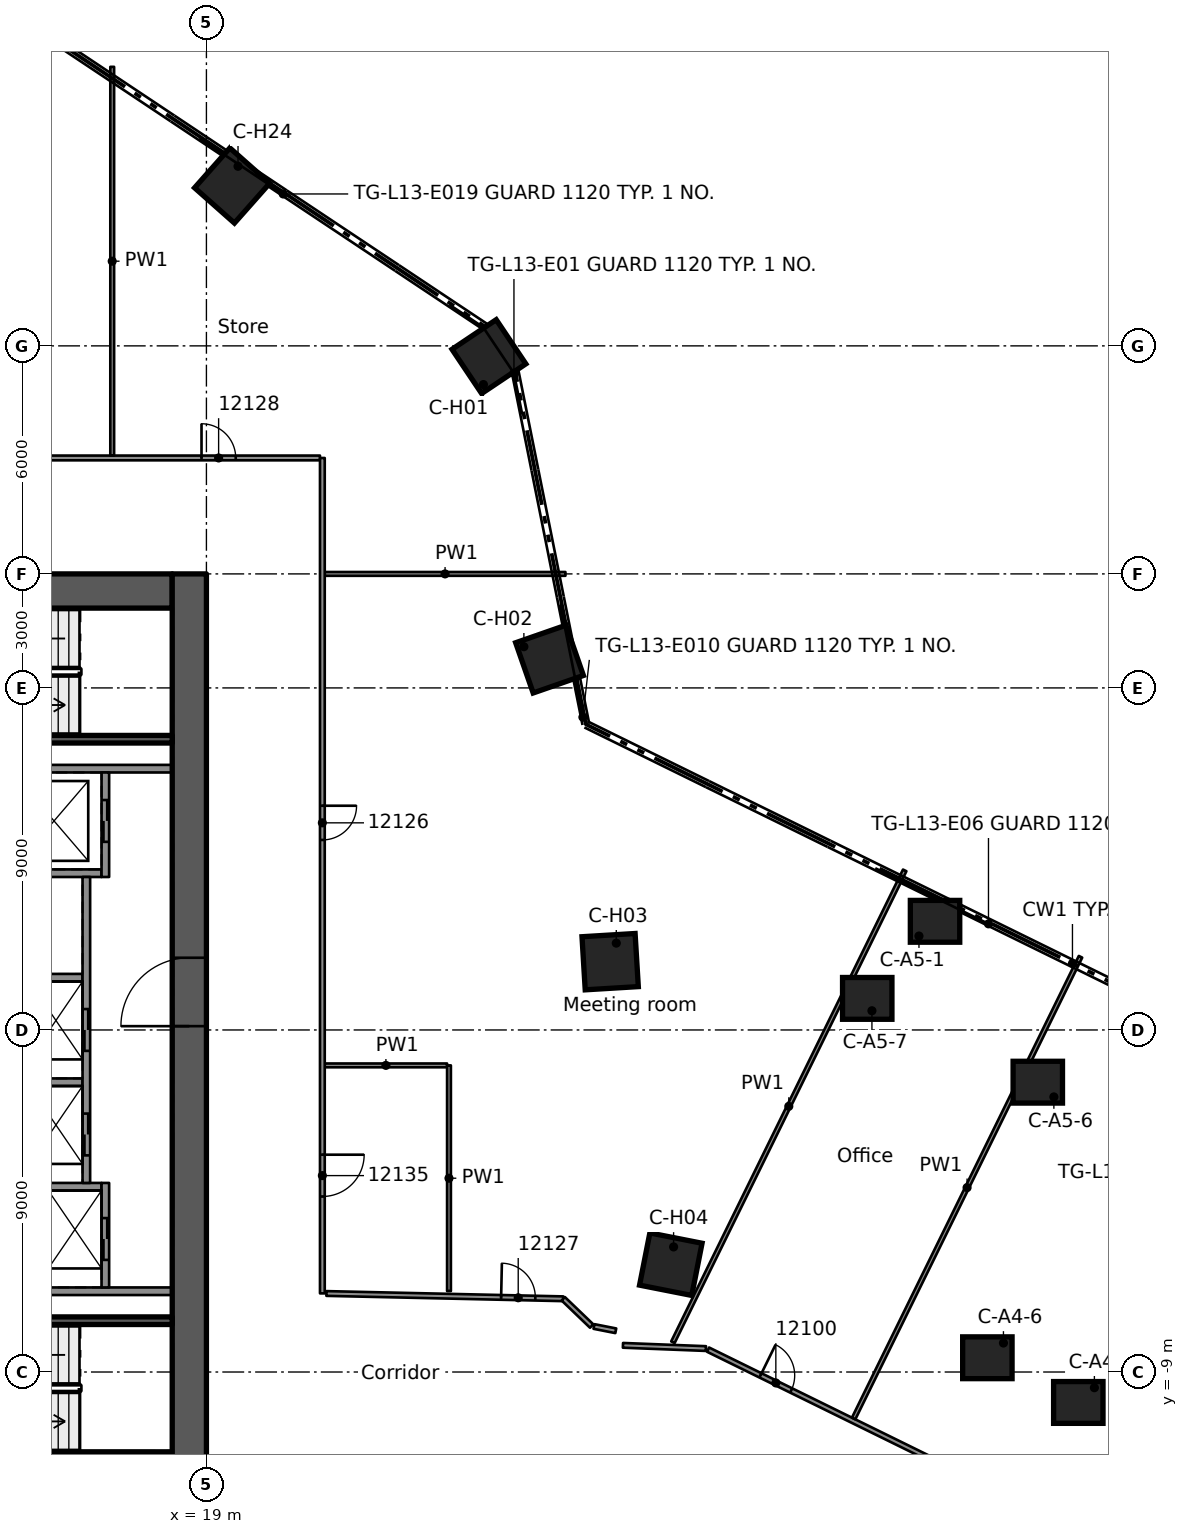
"""IFC4 building model, lengths in metres.
Left out: names, types, materials, properties, quantities, classifications, styles, units other than length and angle.
Written with IfcOpenShell. Run it as: python <this file> out.ifc"""

import sys

from ifc_helpers import new_model, si_unit, direction, frame, frame_2d, origin, origin_2d, place, context, subcontext, project, spatial, rectangle, extrude, element, fill, save


model = new_model("IFC4")
c1 = context("Model", 3, precision=1e-05, world=origin(), true_north=direction((0.0, 1.0)))
c2 = subcontext(c1, "Body", "Model", "MODEL_VIEW")
j1 = project(units=[si_unit("LENGTHUNIT", "METRE"), si_unit("PLANEANGLEUNIT", "RADIAN")], contexts=[c1])
p1 = place(None, origin())
s1 = spatial("IfcSite", under=j1, at=p1, CompositionType="ELEMENT")
p2 = place(p1, origin())
s2 = spatial("IfcBuilding", under=s1, at=p2, CompositionType="ELEMENT")
p3 = place(p2, frame((0.0, 0.0, 58.8)))
s3 = spatial("IfcBuildingStorey", under=s2, at=p3, CompositionType="ELEMENT", Elevation=58.8)
p4 = place(p3, frame((8.9, 11.55, 0.0), z_axis=(0.0, 0.0, 1.0), x_axis=(1.0, 0.0, 0.0)))
e1 = element("IfcWall", 1, at=p4, inside=s3, PredefinedType="SHEAR", context=c2, shape_type="SweptSolid", body=[
    extrude(rectangle(XDim=9.2, YDim=0.9, at=frame_2d((4.6, 0.0))), origin(), (0.0, 0.0, 1.0), 3.5),
])
p5 = place(p4, frame((3.0, 0.0, 0.0)))
e2 = element("IfcOpeningElement", 2, at=p5, cuts=e1, PredefinedType="OPENING", context=c2, shape_type="SweptSolid", body=[
    extrude(rectangle(XDim=1.1, YDim=2.1, at=frame_2d((0.55, 1.05))), frame((0.0, 0.46, 0.0), z_axis=(0.0, -1.0, 0.0), x_axis=(1.0, 0.0, 0.0)), (0.0, 0.0, 1.0), 0.92),
])
p6 = place(p3, frame((8.9, -11.55, 0.0), z_axis=(0.0, 0.0, 1.0), x_axis=(1.0, 0.0, 0.0)))
e3 = element("IfcWall", 3, at=p6, inside=s3, PredefinedType="SHEAR", context=c2, shape_type="SweptSolid", body=[
    extrude(rectangle(XDim=9.2, YDim=0.9, at=frame_2d((4.6, 0.0))), origin(), (0.0, 0.0, 1.0), 3.5),
])
p7 = place(p6, frame((3.0, 0.0, 0.0)))
e4 = element("IfcOpeningElement", 4, at=p7, cuts=e3, PredefinedType="OPENING", context=c2, shape_type="SweptSolid", body=[
    extrude(rectangle(XDim=1.1, YDim=2.1, at=frame_2d((0.55, 1.05))), frame((0.0, 0.46, 0.0), z_axis=(0.0, -1.0, 0.0), x_axis=(1.0, 0.0, 0.0)), (0.0, 0.0, 1.0), 0.92),
])
p8 = place(p3, frame((18.55, -12.0, 0.0), z_axis=(0.0, 0.0, 1.0), x_axis=(0.0, 1.0, 0.0)))
e5 = element("IfcWall", 5, at=p8, inside=s3, PredefinedType="SHEAR", context=c2, shape_type="SweptSolid", body=[
    extrude(rectangle(XDim=24.0, YDim=0.9, at=frame_2d((12.0, 0.0))), origin(), (0.0, 0.0, 1.0), 3.5),
])
p9 = place(p8, frame((12.1, 0.0, 0.0)))
e6 = element("IfcOpeningElement", 6, at=p9, cuts=e5, PredefinedType="OPENING", context=c2, shape_type="SweptSolid", body=[
    extrude(rectangle(XDim=1.8, YDim=2.1, at=frame_2d((0.9, 1.05))), frame((0.0, 0.46, 0.0), z_axis=(0.0, -1.0, 0.0), x_axis=(1.0, 0.0, 0.0)), (0.0, 0.0, 1.0), 0.92),
])
for number, where, z_axis, x_axis in (
    (7, (41.943, -9.801, 0.0), (0.0, 0.0, 1.0), (1.0, 0.0, 0.0)),
    (8, (39.55, -8.625, 0.0), (0.0, 0.0, 1.0), (1.0, 0.0, 0.0)),
    (9, (38.173, 2.859, 0.0), (0.0, 0.0, 1.0), (1.0, 0.0, 0.0)),
    (10, (40.877, -1.374, 0.0), (0.0, 0.0, 1.0), (1.0, 0.0, 0.0)),
    (11, (36.389, 0.831, 0.0), (0.0, 0.0, 1.0), (1.0, 0.0, 0.0)),
):
    element("IfcColumn", number, at=place(p3, frame(where, z_axis=z_axis, x_axis=x_axis)), inside=s3, PredefinedType="COLUMN", context=c2, shape_type="SweptSolid", body=[
        extrude(rectangle(XDim=1.3, YDim=1.1, at=origin_2d()), origin(), (0.0, 0.0, 1.0), 3.5),
    ])
for number, where, z_axis, x_axis in (
    (12, (26.434, 17.718, 0.0), (0.0, 0.0, 1.0), (0.831, 0.557, 0.0)),
    (13, (28.029, 9.758, 0.0), (0.0, 0.0, 1.0), (0.944, 0.329, 0.0)),
    (14, (29.624, 1.797, 0.0), (0.0, 0.0, 1.0), (0.998, 0.061, 0.0)),
    (15, (31.22, -6.163, 0.0), (0.0, 0.0, 1.0), (0.981, -0.194, 0.0)),
    (16, (19.677, 22.219, 0.0), (0.0, 0.0, 1.0), (0.663, 0.749, 0.0)),
):
    element("IfcColumn", number, at=place(p3, frame(where, z_axis=z_axis, x_axis=x_axis)), inside=s3, PredefinedType="COLUMN", context=c2, shape_type="SweptSolid", body=[
        extrude(rectangle(XDim=1.4, YDim=1.4, at=origin_2d()), origin(), (0.0, 0.0, 1.0), 3.5),
    ])
for number, where, z_axis, x_axis in (
    (17, (11.54, -6.875, 0.0), (0.0, 0.0, 1.0), (1.0, 0.0, 0.0)),
    (18, (11.54, 6.875, 0.0), (0.0, 0.0, 1.0), (1.0, 0.0, 0.0)),
):
    element("IfcWall", number, at=place(p3, frame(where, z_axis=z_axis, x_axis=x_axis)), inside=s3, PredefinedType="SOLIDWALL", context=c2, shape_type="SweptSolid", body=[
        extrude(rectangle(XDim=6.56, YDim=0.2, at=frame_2d((3.28, 0.0))), origin(), (0.0, 0.0, 1.0), 3.09),
    ])
p10 = place(p3, frame((11.54, 4.125, 0.0), z_axis=(0.0, 0.0, 1.0), x_axis=(1.0, 0.0, 0.0)))
e19 = element("IfcWall", 19, at=p10, inside=s3, PredefinedType="SOLIDWALL", context=c2, shape_type="SweptSolid", body=[
    extrude(rectangle(XDim=4.7, YDim=0.2, at=frame_2d((2.35, 0.0))), origin(), (0.0, 0.0, 1.0), 3.09),
])
for number, where, z_axis, x_axis in (
    (20, (11.54, 1.375, 0.0), (0.0, 0.0, 1.0), (1.0, 0.0, 0.0)),
    (21, (11.54, -1.375, 0.0), (0.0, 0.0, 1.0), (1.0, 0.0, 0.0)),
):
    element("IfcWall", number, at=place(p3, frame(where, z_axis=z_axis, x_axis=x_axis)), inside=s3, PredefinedType="SOLIDWALL", context=c2, shape_type="SweptSolid", body=[
        extrude(rectangle(XDim=4.2, YDim=0.2, at=frame_2d((2.1, 0.0))), origin(), (0.0, 0.0, 1.0), 3.09),
    ])
p11 = place(p3, frame((11.54, -4.125, 0.0), z_axis=(0.0, 0.0, 1.0), x_axis=(1.0, 0.0, 0.0)))
e22 = element("IfcWall", 22, at=p11, inside=s3, PredefinedType="SOLIDWALL", context=c2, shape_type="SweptSolid", body=[
    extrude(rectangle(XDim=4.7, YDim=0.2, at=frame_2d((2.35, 0.0))), origin(), (0.0, 0.0, 1.0), 3.09),
])
p12 = place(p3, frame((16.34, 6.775, 0.0), z_axis=(0.0, 0.0, 1.0), x_axis=(0.0, -1.0, 0.0)))
e23 = element("IfcWall", 23, at=p12, inside=s3, PredefinedType="SOLIDWALL", context=c2, shape_type="SweptSolid", body=[
    extrude(rectangle(XDim=2.75, YDim=0.2, at=frame_2d((1.375, 0.0))), origin(), (0.0, 0.0, 1.0), 3.09),
])
p13 = place(p12, frame((0.725, 0.0, 0.0)))
e24 = element("IfcOpeningElement", 24, at=p13, cuts=e23, PredefinedType="OPENING", context=c2, shape_type="SweptSolid", body=[
    extrude(rectangle(XDim=1.1, YDim=2.1, at=frame_2d((0.55, 1.05))), frame((0.0, 0.11, 0.0), z_axis=(0.0, -1.0, 0.0), x_axis=(1.0, 0.0, 0.0)), (0.0, 0.0, 1.0), 0.22),
])
p14 = place(p3, frame((15.84, 4.025, 0.0), z_axis=(0.0, 0.0, 1.0), x_axis=(0.0, -1.0, 0.0)))
e25 = element("IfcWall", 25, at=p14, inside=s3, PredefinedType="SOLIDWALL", context=c2, shape_type="SweptSolid", body=[
    extrude(rectangle(XDim=8.05, YDim=0.2, at=frame_2d((4.025, 0.0))), origin(), (0.0, 0.0, 1.0), 3.09),
])
p15 = place(p14, frame((3.475, 0.0, 0.0)))
e26 = element("IfcOpeningElement", 26, at=p15, cuts=e25, PredefinedType="OPENING", context=c2, shape_type="SweptSolid", body=[
    extrude(rectangle(XDim=1.1, YDim=2.1, at=frame_2d((0.55, 1.05))), frame((0.0, 0.11, 0.0), z_axis=(0.0, -1.0, 0.0), x_axis=(1.0, 0.0, 0.0)), (0.0, 0.0, 1.0), 0.22),
])
p16 = place(p14, frame((6.225, 0.0, 0.0)))
e27 = element("IfcOpeningElement", 27, at=p16, cuts=e25, PredefinedType="OPENING", context=c2, shape_type="SweptSolid", body=[
    extrude(rectangle(XDim=1.1, YDim=2.1, at=frame_2d((0.55, 1.05))), frame((0.0, 0.11, 0.0), z_axis=(0.0, -1.0, 0.0), x_axis=(1.0, 0.0, 0.0)), (0.0, 0.0, 1.0), 0.22),
])
p17 = place(p3, frame((16.34, -4.025, 0.0), z_axis=(0.0, 0.0, 1.0), x_axis=(0.0, -1.0, 0.0)))
e28 = element("IfcWall", 28, at=p17, inside=s3, PredefinedType="SOLIDWALL", context=c2, shape_type="SweptSolid", body=[
    extrude(rectangle(XDim=2.75, YDim=0.2, at=frame_2d((1.375, 0.0))), origin(), (0.0, 0.0, 1.0), 3.09),
])
p18 = place(p17, frame((0.925, 0.0, 0.0)))
e29 = element("IfcOpeningElement", 29, at=p18, cuts=e28, PredefinedType="OPENING", context=c2, shape_type="SweptSolid", body=[
    extrude(rectangle(XDim=1.1, YDim=2.1, at=frame_2d((0.55, 1.05))), frame((0.0, 0.11, 0.0), z_axis=(0.0, -1.0, 0.0), x_axis=(1.0, 0.0, 0.0)), (0.0, 0.0, 1.0), 0.22),
])
for number, where, z_axis, x_axis in (
    (30, (11.54, -7.65, 0.0), (0.0, 0.0, 1.0), (1.0, 0.0, 0.0)),
    (31, (11.54, 7.65, 0.0), (0.0, 0.0, 1.0), (1.0, 0.0, 0.0)),
):
    element("IfcWall", number, at=place(p3, frame(where, z_axis=z_axis, x_axis=x_axis)), inside=s3, PredefinedType="SOLIDWALL", context=c2, shape_type="SweptSolid", body=[
        extrude(rectangle(XDim=6.56, YDim=0.2, at=frame_2d((3.28, 0.0))), origin(), (0.0, 0.0, 1.0), 3.09),
    ])
p19 = place(p3, frame((32.2, -8.411, 0.0), z_axis=(0.0, 0.0, 1.0), x_axis=(0.897530587373, -0.440952202318, 0.0)))
e32 = element("IfcWall", 32, at=p19, inside=s3, PredefinedType="PARTITIONING", context=c2, shape_type="SweptSolid", body=[
    extrude(rectangle(XDim=17.78, YDim=0.125, at=frame_2d((8.89, 0.0))), origin(), (0.0, 0.0, 1.0), 3.08),
])
p20 = place(p19, frame((1.538, 0.0, 0.0)))
e33 = element("IfcOpeningElement", 33, at=p20, cuts=e32, PredefinedType="OPENING", context=c2, shape_type="SweptSolid", body=[
    extrude(rectangle(XDim=0.9, YDim=2.1, at=frame_2d((0.45, 1.05))), frame((0.0, 0.073, 0.0), z_axis=(0.0, -1.0, 0.0), x_axis=(1.0, 0.0, 0.0)), (0.0, 0.0, 1.0), 0.145),
])
p21 = place(p19, frame((13.24, 0.0, 0.0)))
e34 = element("IfcOpeningElement", 34, at=p21, cuts=e32, PredefinedType="OPENING", context=c2, shape_type="SweptSolid", body=[
    extrude(rectangle(XDim=0.9, YDim=2.1, at=frame_2d((0.45, 1.05))), frame((0.0, 0.073, 0.0), z_axis=(0.0, -1.0, 0.0), x_axis=(1.0, 0.0, 0.0)), (0.0, 0.0, 1.0), 0.145),
])
p22 = place(p3, frame((32.144, -8.383, 0.0), z_axis=(0.0, 0.0, 1.0), x_axis=(-0.999243574473, 0.038888029962, 0.0)))
e35 = element("IfcWall", 35, at=p22, inside=s3, PredefinedType="PARTITIONING", context=c2, shape_type="SweptSolid", body=[
    extrude(rectangle(XDim=2.185, YDim=0.125, at=frame_2d((1.092, 0.0))), origin(), (0.0, 0.0, 1.0), 3.08),
])
p23 = place(p3, frame((29.198, -7.802, 0.0), z_axis=(0.0, 0.0, 1.0), x_axis=(0.98115426744, -0.19322604246, 0.0)))
e36 = element("IfcWall", 36, at=p23, inside=s3, PredefinedType="PARTITIONING", context=c2, shape_type="SweptSolid", body=[
    extrude(rectangle(XDim=0.585, YDim=0.125, at=frame_2d((0.292, 0.0))), origin(), (0.0, 0.0, 1.0), 3.08),
])
p24 = place(p3, frame((22.158, -6.934, 0.0), z_axis=(0.0, 0.0, 1.0), x_axis=(0.999751648266, -0.022285461407, 0.0)))
e37 = element("IfcWall", 37, at=p24, inside=s3, PredefinedType="PARTITIONING", context=c2, shape_type="SweptSolid", body=[
    extrude(rectangle(XDim=6.233, YDim=0.125, at=frame_2d((3.117, 0.0))), origin(), (0.0, 0.0, 1.0), 3.08),
])
p25 = place(p24, frame((4.598, 0.0, 0.0)))
e38 = element("IfcOpeningElement", 38, at=p25, cuts=e37, PredefinedType="OPENING", context=c2, shape_type="SweptSolid", body=[
    extrude(rectangle(XDim=0.9, YDim=2.1, at=frame_2d((0.45, 1.05))), frame((0.0, 0.073, 0.0), z_axis=(0.0, -1.0, 0.0), x_axis=(1.0, 0.0, 0.0)), (0.0, 0.0, 1.0), 0.145),
])
p26 = place(p3, frame((22.113, -0.932, 0.0), z_axis=(0.0, 0.0, 1.0), x_axis=(1.0, 0.0, 0.0)))
e39 = element("IfcWall", 39, at=p26, inside=s3, PredefinedType="PARTITIONING", context=c2, shape_type="SweptSolid", body=[
    extrude(rectangle(XDim=3.22, YDim=0.1, at=frame_2d((1.61, 0.0))), origin(), (0.0, 0.0, 1.0), 3.08),
])
p27 = place(p3, frame((22.113, 12.0, 0.0), z_axis=(0.0, 0.0, 1.0), x_axis=(1.0, 0.0, 0.0)))
e40 = element("IfcWall", 40, at=p27, inside=s3, PredefinedType="PARTITIONING", context=c2, shape_type="SweptSolid", body=[
    extrude(rectangle(XDim=6.334, YDim=0.1, at=frame_2d((3.167, 0.0))), origin(), (0.0, 0.0, 1.0), 3.08),
])
p28 = place(p3, frame((10.991, 15.051, 0.0), z_axis=(0.0, 0.0, 1.0), x_axis=(1.0, 0.0, 0.0)))
e41 = element("IfcWall", 41, at=p28, inside=s3, PredefinedType="PARTITIONING", context=c2, shape_type="SweptSolid", body=[
    extrude(rectangle(XDim=10.997, YDim=0.125, at=frame_2d((5.499, 0.0))), origin(), (0.0, 0.0, 1.0), 3.08),
])
p29 = place(p28, frame((7.88, 0.0, 0.0)))
e42 = element("IfcOpeningElement", 42, at=p29, cuts=e41, PredefinedType="OPENING", context=c2, shape_type="SweptSolid", body=[
    extrude(rectangle(XDim=0.9, YDim=2.1, at=frame_2d((0.45, 1.05))), frame((0.0, 0.073, 0.0), z_axis=(0.0, -1.0, 0.0), x_axis=(1.0, 0.0, 0.0)), (0.0, 0.0, 1.0), 0.145),
])
p30 = place(p3, frame((36.031, -10.223, 0.0), z_axis=(0.0, 0.0, 1.0), x_axis=(0.44102750491, 0.897493587672, 0.0)))
e43 = element("IfcWall", 43, at=p30, inside=s3, PredefinedType="PARTITIONING", context=c2, shape_type="SweptSolid", body=[
    extrude(rectangle(XDim=13.537, YDim=0.1, at=frame_2d((6.768, 0.0))), origin(), (0.0, 0.0, 1.0), 3.08),
])
p31 = place(p3, frame((31.275, -8.217, 0.0), z_axis=(0.0, 0.0, 1.0), x_axis=(0.440962245693, 0.897525653045, 0.0)))
e44 = element("IfcWall", 44, at=p31, inside=s3, PredefinedType="PARTITIONING", context=c2, shape_type="SweptSolid", body=[
    extrude(rectangle(XDim=13.833, YDim=0.1, at=frame_2d((6.917, 0.0))), origin(), (0.0, 0.0, 1.0), 3.08),
])
p32 = place(p3, frame((29.137, -7.79, 0.0), z_axis=(0.0, 0.0, 1.0), x_axis=(-0.721457989557, 0.692458207623, 0.0)))
e45 = element("IfcWall", 45, at=p32, inside=s3, PredefinedType="PARTITIONING", context=c2, shape_type="SweptSolid", body=[
    extrude(rectangle(XDim=1.035, YDim=0.125, at=frame_2d((0.518, 0.0))), origin(), (0.0, 0.0, 1.0), 3.08),
])
p33 = place(p3, frame((25.383, -6.87, 0.0), z_axis=(0.0, 0.0, 1.0), x_axis=(0.0, 1.0, 0.0)))
e46 = element("IfcWall", 46, at=p33, inside=s3, PredefinedType="PARTITIONING", context=c2, shape_type="SweptSolid", body=[
    extrude(rectangle(XDim=5.938, YDim=0.1, at=frame_2d((2.969, 0.0))), origin(), (0.0, 0.0, 1.0), 3.08),
])
p34 = place(p3, frame((22.051, 15.05, 0.0), z_axis=(0.0, 0.0, 1.0), x_axis=(0.0, -1.0, 0.0)))
e47 = element("IfcWall", 47, at=p34, inside=s3, PredefinedType="PARTITIONING", context=c2, shape_type="SweptSolid", body=[
    extrude(rectangle(XDim=21.981, YDim=0.125, at=frame_2d((10.99, 0.0))), origin(), (0.0, 0.0, 1.0), 3.08),
])
p35 = place(p34, frame((9.15, 0.0, 0.0)))
e48 = element("IfcOpeningElement", 48, at=p35, cuts=e47, PredefinedType="OPENING", context=c2, shape_type="SweptSolid", body=[
    extrude(rectangle(XDim=0.9, YDim=2.1, at=frame_2d((0.45, 1.05))), frame((0.0, 0.073, 0.0), z_axis=(0.0, -1.0, 0.0), x_axis=(1.0, 0.0, 0.0)), (0.0, 0.0, 1.0), 0.145),
])
p36 = place(p34, frame((18.332, 0.0, 0.0)))
e49 = element("IfcOpeningElement", 49, at=p36, cuts=e47, PredefinedType="OPENING", context=c2, shape_type="SweptSolid", body=[
    extrude(rectangle(XDim=1.1, YDim=2.1, at=frame_2d((0.55, 1.05))), frame((0.0, 0.073, 0.0), z_axis=(0.0, -1.0, 0.0), x_axis=(1.0, 0.0, 0.0)), (0.0, 0.0, 1.0), 0.145),
])
p37 = place(p3, frame((16.521, 15.114, 0.0), z_axis=(0.0, 0.0, 1.0), x_axis=(0.0, 1.0, 0.0)))
e50 = element("IfcWall", 50, at=p37, inside=s3, PredefinedType="PARTITIONING", context=c2, shape_type="SweptSolid", body=[
    extrude(rectangle(XDim=10.228, YDim=0.1, at=frame_2d((5.114, 0.0))), origin(), (0.0, 0.0, 1.0), 3.08),
])
p38 = place(p13, origin())
e51 = element("IfcDoor", 51, at=p38, inside=s3, OperationType="DOUBLE_DOOR_SLIDING", PredefinedType="DOOR", context=c2, shape_type="SweptSolid", body=[
    extrude(rectangle(XDim=1.1, YDim=2.1, at=frame_2d((0.55, 1.05))), frame((0.0, 0.025, 0.0), z_axis=(0.0, -1.0, 0.0), x_axis=(1.0, 0.0, 0.0)), (0.0, 0.0, 1.0), 0.05),
])
fill(e24, e51)
p39 = place(p15, origin())
e52 = element("IfcDoor", 52, at=p39, inside=s3, OperationType="DOUBLE_DOOR_SLIDING", PredefinedType="DOOR", context=c2, shape_type="SweptSolid", body=[
    extrude(rectangle(XDim=1.1, YDim=2.1, at=frame_2d((0.55, 1.05))), frame((0.0, 0.025, 0.0), z_axis=(0.0, -1.0, 0.0), x_axis=(1.0, 0.0, 0.0)), (0.0, 0.0, 1.0), 0.05),
])
fill(e26, e52)
p40 = place(p16, origin())
e53 = element("IfcDoor", 53, at=p40, inside=s3, OperationType="DOUBLE_DOOR_SLIDING", PredefinedType="DOOR", context=c2, shape_type="SweptSolid", body=[
    extrude(rectangle(XDim=1.1, YDim=2.1, at=frame_2d((0.55, 1.05))), frame((0.0, 0.025, 0.0), z_axis=(0.0, -1.0, 0.0), x_axis=(1.0, 0.0, 0.0)), (0.0, 0.0, 1.0), 0.05),
])
fill(e27, e53)
p41 = place(p18, origin())
e54 = element("IfcDoor", 54, at=p41, inside=s3, OperationType="DOUBLE_DOOR_SLIDING", PredefinedType="DOOR", context=c2, shape_type="SweptSolid", body=[
    extrude(rectangle(XDim=1.1, YDim=2.1, at=frame_2d((0.55, 1.05))), frame((0.0, 0.025, 0.0), z_axis=(0.0, -1.0, 0.0), x_axis=(1.0, 0.0, 0.0)), (0.0, 0.0, 1.0), 0.05),
])
fill(e29, e54)
p42 = place(p9, origin())
e55 = element("IfcDoor", 55, at=p42, inside=s3, OperationType="SINGLE_SWING_RIGHT", PredefinedType="DOOR", context=c2, shape_type="SweptSolid", body=[
    extrude(rectangle(XDim=1.8, YDim=2.1, at=frame_2d((0.9, 1.05))), frame((0.0, 0.025, 0.0), z_axis=(0.0, -1.0, 0.0), x_axis=(1.0, 0.0, 0.0)), (0.0, 0.0, 1.0), 0.05),
])
fill(e6, e55)
p43 = place(p20, origin())
e56 = element("IfcDoor", 56, at=p43, inside=s3, OperationType="SINGLE_SWING_LEFT", PredefinedType="DOOR", context=c2, shape_type="SweptSolid", body=[
    extrude(rectangle(XDim=0.9, YDim=2.1, at=frame_2d((0.45, 1.05))), frame((0.0, 0.025, 0.0), z_axis=(0.0, -1.0, 0.0), x_axis=(1.0, 0.0, 0.0)), (0.0, 0.0, 1.0), 0.05),
])
fill(e33, e56)
p44 = place(p35, origin())
e57 = element("IfcDoor", 57, at=p44, inside=s3, OperationType="SINGLE_SWING_LEFT", PredefinedType="DOOR", context=c2, shape_type="SweptSolid", body=[
    extrude(rectangle(XDim=0.9, YDim=2.1, at=frame_2d((0.45, 1.05))), frame((0.0, 0.025, 0.0), z_axis=(0.0, -1.0, 0.0), x_axis=(1.0, 0.0, 0.0)), (0.0, 0.0, 1.0), 0.05),
])
fill(e48, e57)
p45 = place(p25, origin())
e58 = element("IfcDoor", 58, at=p45, inside=s3, OperationType="SINGLE_SWING_RIGHT", PredefinedType="DOOR", context=c2, shape_type="SweptSolid", body=[
    extrude(rectangle(XDim=0.9, YDim=2.1, at=frame_2d((0.45, 1.05))), frame((0.0, 0.025, 0.0), z_axis=(0.0, -1.0, 0.0), x_axis=(1.0, 0.0, 0.0)), (0.0, 0.0, 1.0), 0.05),
])
fill(e38, e58)
p46 = place(p29, origin())
e59 = element("IfcDoor", 59, at=p46, inside=s3, OperationType="SINGLE_SWING_RIGHT", PredefinedType="DOOR", context=c2, shape_type="SweptSolid", body=[
    extrude(rectangle(XDim=0.9, YDim=2.1, at=frame_2d((0.45, 1.05))), frame((0.0, 0.025, 0.0), z_axis=(0.0, -1.0, 0.0), x_axis=(1.0, 0.0, 0.0)), (0.0, 0.0, 1.0), 0.05),
])
fill(e42, e59)
p47 = place(p36, origin())
e60 = element("IfcDoor", 60, at=p47, inside=s3, OperationType="SINGLE_SWING_RIGHT", PredefinedType="DOOR", context=c2, shape_type="SweptSolid", body=[
    extrude(rectangle(XDim=1.1, YDim=2.1, at=frame_2d((0.55, 1.05))), frame((0.0, 0.025, 0.0), z_axis=(0.0, -1.0, 0.0), x_axis=(1.0, 0.0, 0.0)), (0.0, 0.0, 1.0), 0.05),
])
fill(e49, e60)
save(model, sys.argv[1])
